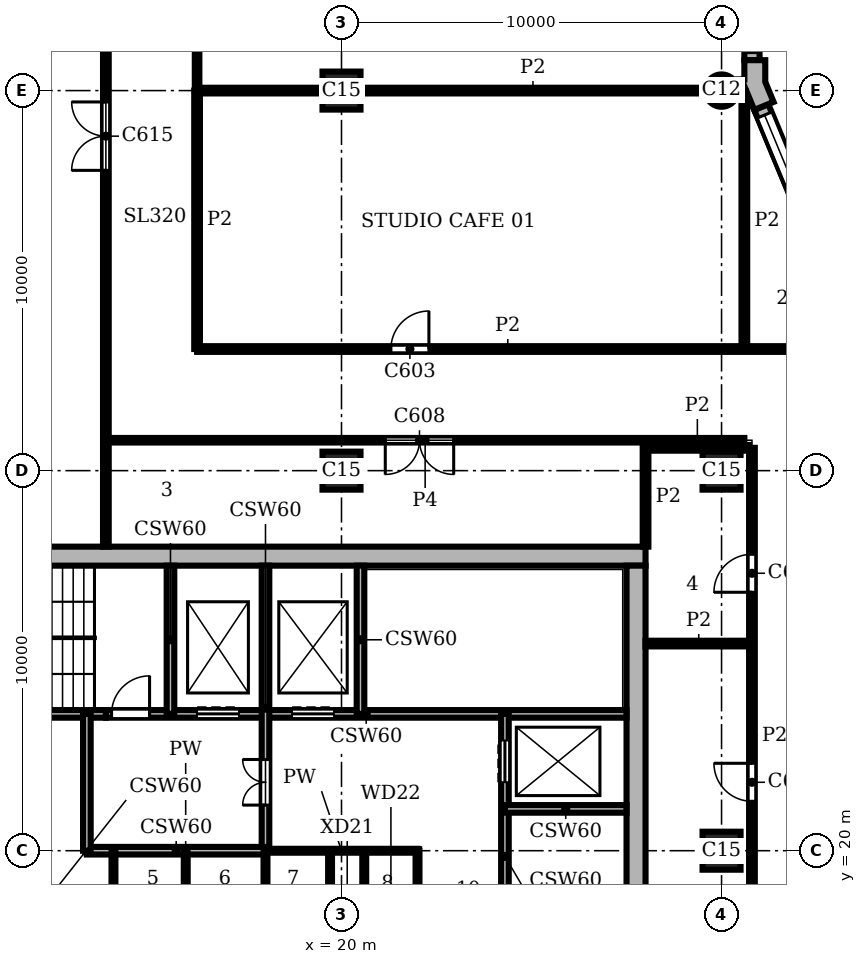
"""IFC4 building model, lengths in metres.
Left out: names, types, materials, properties, quantities, classifications, styles, units other than length and angle.
Written with IfcOpenShell. Run it as: python <this file> out.ifc"""

import sys

from ifc_helpers import new_model, si_unit, direction, frame, frame_2d, origin, origin_2d, place, context, subcontext, project, spatial, polyline, rectangle, circle, outline, extrude, element, fill, save


model = new_model("IFC4")
c1 = context("Model", 3, precision=1e-05, world=origin(), true_north=direction((0.0, 1.0)))
c2 = subcontext(c1, "Body", "Model", "MODEL_VIEW")
j1 = project(units=[si_unit("LENGTHUNIT", "METRE"), si_unit("PLANEANGLEUNIT", "RADIAN")], contexts=[c1])
p1 = place(None, origin())
s1 = spatial("IfcSite", under=j1, at=p1, CompositionType="ELEMENT")
p2 = place(p1, origin())
s2 = spatial("IfcBuilding", under=s1, at=p2, CompositionType="ELEMENT")
p3 = place(p2, frame((0.0, 0.0, 294.3)))
s3 = spatial("IfcBuildingStorey", under=s2, at=p3, CompositionType="ELEMENT", Elevation=294.3)
p4 = place(p3, frame((30.0, 40.0, 0.0), z_axis=(0.0, 0.0, 1.0), x_axis=(1.0, 0.0, 0.0)))
e1 = element("IfcColumn", 1, at=p4, inside=s3, PredefinedType="COLUMN", context=c2, shape_type="SweptSolid", body=[
    extrude(circle(Radius=0.425, at=origin_2d()), origin(), (0.0, 0.0, 1.0), 3.9),
])
for number, where, z_axis, x_axis in (
    (2, (20.0, 30.0, 0.0), (0.0, 0.0, 1.0), (1.0, 0.0, 0.0)),
    (3, (20.0, 40.0, 0.0), (0.0, 0.0, 1.0), (1.0, 0.0, 0.0)),
    (4, (30.0, 20.0, 0.0), (0.0, 0.0, 1.0), (1.0, 0.0, 0.0)),
    (5, (30.0, 30.0, 0.0), (0.0, 0.0, 1.0), (1.0, 0.0, 0.0)),
):
    element("IfcColumn", number, at=place(p3, frame(where, z_axis=z_axis, x_axis=x_axis)), inside=s3, PredefinedType="COLUMN", context=c2, shape_type="SweptSolid", body=[
        extrude(rectangle(XDim=1.0, YDim=1.0, at=origin_2d()), origin(), (0.0, 0.0, 1.0), 3.9),
    ])
p5 = place(p3, frame((27.75, 8.5, 0.0), z_axis=(0.0, 0.0, 1.0), x_axis=(0.0, 1.0, 0.0)))
e6 = element("IfcWall", 6, at=p5, inside=s3, PredefinedType="SHEAR", context=c2, shape_type="SweptSolid", body=[
    extrude(rectangle(XDim=19.0, YDim=0.5, at=frame_2d((9.5, 0.0))), origin(), (0.0, 0.0, 1.0), 3.9),
])
p6 = place(p5, frame((4.95, 0.0, 0.0)))
e7 = element("IfcOpeningElement", 7, at=p6, cuts=e6, PredefinedType="OPENING", context=c2, shape_type="SweptSolid", body=[
    extrude(rectangle(XDim=1.6, YDim=2.1, at=frame_2d((0.8, 1.05))), frame((0.0, 0.26, 0.0), z_axis=(0.0, -1.0, 0.0), x_axis=(1.0, 0.0, 0.0)), (0.0, 0.0, 1.0), 0.52),
])
p7 = place(p3, frame((28.0, 27.75, 0.0), z_axis=(0.0, 0.0, 1.0), x_axis=(-1.0, 0.0, 0.0)))
e8 = element("IfcWall", 8, at=p7, inside=s3, PredefinedType="SHEAR", context=c2, shape_type="SweptSolid", body=[
    extrude(rectangle(XDim=20.0, YDim=0.5, at=frame_2d((10.0, 0.0))), origin(), (0.0, 0.0, 1.0), 3.9),
])
p8 = place(p3, origin())
e9 = element("IfcWall", 9, at=p8, inside=s3, PredefinedType="SOLIDWALL", context=c2, shape_type="SweptSolid", body=[
    extrude(outline(polyline([(30.62, 39.995), (30.62, 40.071), (30.861, 39.49), (31.23, 39.644), (31.369, 39.701), (31.15, 40.229), (31.15, 40.8), (31.0, 40.8), (30.6, 40.8), (30.6, 40.295), (30.425, 40.295), (30.425, 39.995), (30.62, 39.995)])), origin(), (0.0, 0.0, 1.0), 3.9),
])
p9 = place(p3, frame((33.362, 33.974, 0.0), z_axis=(0.0, 0.0, 1.0), x_axis=(-0.382655745237, 0.923891000409, 0.0)))
e10 = element("IfcWall", 10, at=p9, inside=s3, PredefinedType="SOLIDWALL", context=c2, shape_type="SweptSolid", body=[
    extrude(rectangle(XDim=6.053, YDim=0.4, at=frame_2d((3.027, 0.0))), origin(), (0.0, 0.0, 1.0), 3.9),
])
p10 = place(p9, frame((0.227, 0.0, 0.9)))
e11 = element("IfcOpeningElement", 11, at=p10, cuts=e10, PredefinedType="OPENING", context=c2, shape_type="SweptSolid", body=[
    extrude(rectangle(XDim=5.6, YDim=2.35, at=frame_2d((2.8, 1.175))), frame((0.0, 0.21, 0.0), z_axis=(0.0, -1.0, 0.0), x_axis=(1.0, 0.0, 0.0)), (0.0, 0.0, 1.0), 0.42),
])
p11 = place(p3, frame((30.8, 40.8, 0.0), z_axis=(0.0, 0.0, 1.0), x_axis=(0.0, 1.0, 0.0)))
e12 = element("IfcWall", 12, at=p11, inside=s3, PredefinedType="SOLIDWALL", context=c2, shape_type="SweptSolid", body=[
    extrude(rectangle(XDim=18.4, YDim=0.4, at=frame_2d((9.2, 0.0))), origin(), (0.0, 0.0, 1.0), 3.9),
])
p12 = place(p11, frame((0.2, 0.0, 0.9)))
e13 = element("IfcOpeningElement", 13, at=p12, cuts=e12, PredefinedType="OPENING", context=c2, shape_type="SweptSolid", body=[
    extrude(rectangle(XDim=8.0, YDim=2.35, at=frame_2d((4.0, 1.175))), frame((0.0, 0.21, 0.0), z_axis=(0.0, -1.0, 0.0), x_axis=(1.0, 0.0, 0.0)), (0.0, 0.0, 1.0), 0.42),
])
p13 = place(p11, frame((10.2, 0.0, 0.9)))
e14 = element("IfcOpeningElement", 14, at=p13, cuts=e12, PredefinedType="OPENING", context=c2, shape_type="SweptSolid", body=[
    extrude(rectangle(XDim=8.0, YDim=2.35, at=frame_2d((4.0, 1.175))), frame((0.0, 0.21, 0.0), z_axis=(0.0, -1.0, 0.0), x_axis=(1.0, 0.0, 0.0)), (0.0, 0.0, 1.0), 0.42),
])
p14 = place(p3, frame((18.0, 20.0, 0.0), z_axis=(0.0, 0.0, 1.0), x_axis=(1.0, 0.0, 0.0)))
e15 = element("IfcWall", 15, at=p14, inside=s3, PredefinedType="PARTITIONING", context=c2, shape_type="SweptSolid", body=[
    extrude(rectangle(XDim=4.0, YDim=0.1, at=frame_2d((2.0, 0.0))), origin(), (0.0, 0.0, 1.0), 3.58),
])
p15 = place(p3, frame((13.3, 20.0, 0.0), z_axis=(0.0, 0.0, 1.0), x_axis=(1.0, 0.0, 0.0)))
e16 = element("IfcWall", 16, at=p15, inside=s3, PredefinedType="SHEAR", context=c2, shape_type="SweptSolid", body=[
    extrude(rectangle(XDim=4.7, YDim=0.2, at=frame_2d((2.35, 0.0))), origin(), (0.0, 0.0, 1.0), 3.58),
])
p16 = place(p3, frame((24.3, 21.1, 0.0), z_axis=(0.0, 0.0, 1.0), x_axis=(1.0, 0.0, 0.0)))
e17 = element("IfcWall", 17, at=p16, inside=s3, PredefinedType="SHEAR", context=c2, shape_type="SweptSolid", body=[
    extrude(rectangle(XDim=3.2, YDim=0.2, at=frame_2d((1.6, 0.0))), origin(), (0.0, 0.0, 1.0), 3.58),
])
p17 = place(p3, frame((8.5, 23.6, 0.0), z_axis=(0.0, 0.0, 1.0), x_axis=(1.0, 0.0, 0.0)))
e18 = element("IfcWall", 18, at=p17, inside=s3, PredefinedType="SHEAR", context=c2, shape_type="SweptSolid", body=[
    extrude(rectangle(XDim=5.3, YDim=0.2, at=frame_2d((2.65, 0.0))), origin(), (0.0, 0.0, 1.0), 3.58),
])
p18 = place(p3, frame((13.8, 23.6, 0.0), z_axis=(0.0, 0.0, 1.0), x_axis=(1.0, 0.0, 0.0)))
e19 = element("IfcWall", 19, at=p18, inside=s3, PredefinedType="SHEAR", context=c2, shape_type="SweptSolid", body=[
    extrude(rectangle(XDim=13.7, YDim=0.2, at=frame_2d((6.85, 0.0))), origin(), (0.0, 0.0, 1.0), 3.58),
])
p19 = place(p18, frame((2.4, 0.0, 0.0)))
e20 = element("IfcOpeningElement", 20, at=p19, cuts=e19, PredefinedType="OPENING", context=c2, shape_type="SweptSolid", body=[
    extrude(rectangle(XDim=1.1, YDim=2.1, at=frame_2d((0.55, 1.05))), frame((0.0, 0.11, 0.0), z_axis=(0.0, -1.0, 0.0), x_axis=(1.0, 0.0, 0.0)), (0.0, 0.0, 1.0), 0.22),
])
p20 = place(p18, frame((4.9, 0.0, 0.0)))
e21 = element("IfcOpeningElement", 21, at=p20, cuts=e19, PredefinedType="OPENING", context=c2, shape_type="SweptSolid", body=[
    extrude(rectangle(XDim=1.1, YDim=2.1, at=frame_2d((0.55, 1.05))), frame((0.0, 0.11, 0.0), z_axis=(0.0, -1.0, 0.0), x_axis=(1.0, 0.0, 0.0)), (0.0, 0.0, 1.0), 0.22),
])
p21 = place(p18, frame((0.15, 0.0, 0.0)))
e22 = element("IfcOpeningElement", 22, at=p21, cuts=e19, PredefinedType="OPENING", context=c2, shape_type="SweptSolid", body=[
    extrude(rectangle(XDim=1.0, YDim=2.1, at=frame_2d((0.5, 1.05))), frame((0.0, 0.11, 0.0), z_axis=(0.0, -1.0, 0.0), x_axis=(1.0, 0.0, 0.0)), (0.0, 0.0, 1.0), 0.22),
])
p22 = place(p3, frame((13.3, 20.0, 0.0), z_axis=(0.0, 0.0, 1.0), x_axis=(0.0, 1.0, 0.0)))
e23 = element("IfcWall", 23, at=p22, inside=s3, PredefinedType="SHEAR", context=c2, shape_type="SweptSolid", body=[
    extrude(rectangle(XDim=3.6, YDim=0.2, at=frame_2d((1.8, 0.0))), origin(), (0.0, 0.0, 1.0), 3.58),
])
p23 = place(p3, frame((14.0, 16.2, 0.0), z_axis=(0.0, 0.0, 1.0), x_axis=(0.0, 1.0, 0.0)))
e24 = element("IfcWall", 24, at=p23, inside=s3, PredefinedType="PARTITIONING", context=c2, shape_type="SweptSolid", body=[
    extrude(rectangle(XDim=3.8, YDim=0.1, at=frame_2d((1.9, 0.0))), origin(), (0.0, 0.0, 1.0), 3.58),
])
p24 = place(p3, frame((15.5, 23.6, 0.0), z_axis=(0.0, 0.0, 1.0), x_axis=(0.0, 1.0, 0.0)))
e25 = element("IfcWall", 25, at=p24, inside=s3, PredefinedType="SHEAR", context=c2, shape_type="SweptSolid", body=[
    extrude(rectangle(XDim=3.9, YDim=0.2, at=frame_2d((1.95, 0.0))), origin(), (0.0, 0.0, 1.0), 3.58),
])
for number, where, z_axis, x_axis in (
    (26, (15.9, 17.7, 0.0), (0.0, 0.0, 1.0), (0.0, 1.0, 0.0)),
    (27, (18.0, 17.7, 0.0), (0.0, 0.0, 1.0), (0.0, 1.0, 0.0)),
):
    element("IfcWall", number, at=place(p3, frame(where, z_axis=z_axis, x_axis=x_axis)), inside=s3, PredefinedType="PARTITIONING", context=c2, shape_type="SweptSolid", body=[
        extrude(rectangle(XDim=2.3, YDim=0.1, at=frame_2d((1.15, 0.0))), origin(), (0.0, 0.0, 1.0), 3.58),
    ])
p25 = place(p3, frame((18.0, 20.0, 0.0), z_axis=(0.0, 0.0, 1.0), x_axis=(0.0, 1.0, 0.0)))
e28 = element("IfcWall", 28, at=p25, inside=s3, PredefinedType="SHEAR", context=c2, shape_type="SweptSolid", body=[
    extrude(rectangle(XDim=7.5, YDim=0.2, at=frame_2d((3.75, 0.0))), origin(), (0.0, 0.0, 1.0), 3.58),
])
p26 = place(p25, frame((1.2, 0.0, 0.0)))
e29 = element("IfcOpeningElement", 29, at=p26, cuts=e28, PredefinedType="OPENING", context=c2, shape_type="SweptSolid", body=[
    extrude(rectangle(XDim=1.2, YDim=2.1, at=frame_2d((0.6, 1.05))), frame((0.0, 0.11, 0.0), z_axis=(0.0, -1.0, 0.0), x_axis=(1.0, 0.0, 0.0)), (0.0, 0.0, 1.0), 0.22),
])
p27 = place(p3, frame((19.7, 17.7, 0.0), z_axis=(0.0, 0.0, 1.0), x_axis=(0.0, 1.0, 0.0)))
e30 = element("IfcWall", 30, at=p27, inside=s3, PredefinedType="PARTITIONING", context=c2, shape_type="SweptSolid", body=[
    extrude(rectangle(XDim=2.3, YDim=0.1, at=frame_2d((1.15, 0.0))), origin(), (0.0, 0.0, 1.0), 3.58),
])
p28 = place(p3, frame((20.5, 23.6, 0.0), z_axis=(0.0, 0.0, 1.0), x_axis=(0.0, 1.0, 0.0)))
e31 = element("IfcWall", 31, at=p28, inside=s3, PredefinedType="SHEAR", context=c2, shape_type="SweptSolid", body=[
    extrude(rectangle(XDim=3.9, YDim=0.2, at=frame_2d((1.95, 0.0))), origin(), (0.0, 0.0, 1.0), 3.58),
])
p29 = place(p3, frame((20.6, 17.7, 0.0), z_axis=(0.0, 0.0, 1.0), x_axis=(0.0, 1.0, 0.0)))
e32 = element("IfcWall", 32, at=p29, inside=s3, PredefinedType="PARTITIONING", context=c2, shape_type="SweptSolid", body=[
    extrude(rectangle(XDim=2.3, YDim=0.1, at=frame_2d((1.15, 0.0))), origin(), (0.0, 0.0, 1.0), 3.58),
])
p30 = place(p3, frame((22.0, 16.2, 0.0), z_axis=(0.0, 0.0, 1.0), x_axis=(0.0, 1.0, 0.0)))
e33 = element("IfcWall", 33, at=p30, inside=s3, PredefinedType="PARTITIONING", context=c2, shape_type="SweptSolid", body=[
    extrude(rectangle(XDim=3.8, YDim=0.1, at=frame_2d((1.9, 0.0))), origin(), (0.0, 0.0, 1.0), 3.58),
])
p31 = place(p30, frame((0.2, 0.0, 0.0)))
e34 = element("IfcOpeningElement", 34, at=p31, cuts=e33, PredefinedType="OPENING", context=c2, shape_type="SweptSolid", body=[
    extrude(rectangle(XDim=1.1, YDim=2.1, at=frame_2d((0.55, 1.05))), frame((0.0, 0.06, 0.0), z_axis=(0.0, -1.0, 0.0), x_axis=(1.0, 0.0, 0.0)), (0.0, 0.0, 1.0), 0.12),
])
p32 = place(p3, frame((24.3, 16.1, 0.0), z_axis=(0.0, 0.0, 1.0), x_axis=(0.0, 1.0, 0.0)))
e35 = element("IfcWall", 35, at=p32, inside=s3, PredefinedType="SHEAR", context=c2, shape_type="SweptSolid", body=[
    extrude(rectangle(XDim=7.5, YDim=0.2, at=frame_2d((3.75, 0.0))), origin(), (0.0, 0.0, 1.0), 3.58),
])
p33 = place(p32, frame((5.7, 0.0, 0.0)))
e36 = element("IfcOpeningElement", 36, at=p33, cuts=e35, PredefinedType="OPENING", context=c2, shape_type="SweptSolid", body=[
    extrude(rectangle(XDim=1.1, YDim=2.1, at=frame_2d((0.55, 1.05))), frame((0.0, 0.11, 0.0), z_axis=(0.0, -1.0, 0.0), x_axis=(1.0, 0.0, 0.0)), (0.0, 0.0, 1.0), 0.22),
])
p34 = place(p3, frame((13.8, 28.0, 0.0), z_axis=(0.0, 0.0, 1.0), x_axis=(0.0, 1.0, 0.0)))
e37 = element("IfcWall", 37, at=p34, inside=s3, PredefinedType="PARTITIONING", context=c2, shape_type="SweptSolid", body=[
    extrude(rectangle(XDim=29.6, YDim=0.15, at=frame_2d((14.8, 0.0))), origin(), (0.0, 0.0, 1.0), 3.58),
])
p35 = place(p34, frame((9.901, 0.0, 0.0)))
e38 = element("IfcOpeningElement", 38, at=p35, cuts=e37, PredefinedType="OPENING", context=c2, shape_type="SweptSolid", body=[
    extrude(rectangle(XDim=1.8, YDim=2.1, at=frame_2d((0.9, 1.05))), frame((0.0, 0.085, 0.0), z_axis=(0.0, -1.0, 0.0), x_axis=(1.0, 0.0, 0.0)), (0.0, 0.0, 1.0), 0.17),
])
p36 = place(p3, frame((16.2, 33.2, 0.0), z_axis=(0.0, 0.0, 1.0), x_axis=(0.0, 1.0, 0.0)))
e39 = element("IfcWall", 39, at=p36, inside=s3, PredefinedType="PARTITIONING", context=c2, shape_type="SweptSolid", body=[
    extrude(rectangle(XDim=6.8, YDim=0.15, at=frame_2d((3.4, 0.0))), origin(), (0.0, 0.0, 1.0), 3.58),
])
p37 = place(p3, frame((28.0, 28.0, 0.0), z_axis=(0.0, 0.0, 1.0), x_axis=(0.0, 1.0, 0.0)))
e40 = element("IfcWall", 40, at=p37, inside=s3, PredefinedType="PARTITIONING", context=c2, shape_type="SweptSolid", body=[
    extrude(rectangle(XDim=2.598, YDim=0.15, at=frame_2d((1.299, 0.0))), origin(), (0.0, 0.0, 1.0), 3.58),
])
p38 = place(p3, frame((30.6, 33.2, 0.0), z_axis=(0.0, 0.0, 1.0), x_axis=(0.0, 1.0, 0.0)))
e41 = element("IfcWall", 41, at=p38, inside=s3, PredefinedType="PARTITIONING", context=c2, shape_type="SweptSolid", body=[
    extrude(rectangle(XDim=6.738, YDim=0.15, at=frame_2d((3.369, 0.0))), origin(), (0.0, 0.0, 1.0), 3.58),
])
p39 = place(p3, frame((30.8, 15.45, 0.0), z_axis=(0.0, 0.0, 1.0), x_axis=(0.0, 1.0, 0.0)))
e42 = element("IfcWall", 42, at=p39, inside=s3, PredefinedType="PARTITIONING", context=c2, shape_type="SweptSolid", body=[
    extrude(rectangle(XDim=15.15, YDim=0.15, at=frame_2d((7.575, 0.0))), origin(), (0.0, 0.0, 1.0), 3.58),
])
p40 = place(p39, frame((5.85, 0.0, 0.0)))
e43 = element("IfcOpeningElement", 43, at=p40, cuts=e42, PredefinedType="OPENING", context=c2, shape_type="SweptSolid", body=[
    extrude(rectangle(XDim=1.0, YDim=2.1, at=frame_2d((0.5, 1.05))), frame((0.0, 0.085, 0.0), z_axis=(0.0, -1.0, 0.0), x_axis=(1.0, 0.0, 0.0)), (0.0, 0.0, 1.0), 0.17),
])
p41 = place(p39, frame((11.35, 0.0, 0.0)))
e44 = element("IfcOpeningElement", 44, at=p41, cuts=e42, PredefinedType="OPENING", context=c2, shape_type="SweptSolid", body=[
    extrude(rectangle(XDim=1.0, YDim=2.1, at=frame_2d((0.5, 1.05))), frame((0.0, 0.085, 0.0), z_axis=(0.0, -1.0, 0.0), x_axis=(1.0, 0.0, 0.0)), (0.0, 0.0, 1.0), 0.17),
])
p42 = place(p3, frame((28.0, 25.45, 0.0), z_axis=(0.0, 0.0, 1.0), x_axis=(1.0, 0.0, 0.0)))
e45 = element("IfcWall", 45, at=p42, inside=s3, PredefinedType="PARTITIONING", context=c2, shape_type="SweptSolid", body=[
    extrude(rectangle(XDim=2.8, YDim=0.15, at=frame_2d((1.4, 0.0))), origin(), (0.0, 0.0, 1.0), 3.58),
])
p43 = place(p3, frame((28.002, 30.6, 0.0), z_axis=(0.0, 0.0, 1.0), x_axis=(1.0, 0.0, 0.0)))
e46 = element("IfcWall", 46, at=p43, inside=s3, PredefinedType="PARTITIONING", context=c2, shape_type="SweptSolid", body=[
    extrude(rectangle(XDim=2.723, YDim=0.15, at=frame_2d((1.362, 0.0))), origin(), (0.0, 0.0, 1.0), 3.58),
])
p44 = place(p3, frame((16.2, 33.2, 0.0), z_axis=(0.0, 0.0, 1.0), x_axis=(1.0, 0.0, 0.0)))
e47 = element("IfcWall", 47, at=p44, inside=s3, PredefinedType="PARTITIONING", context=c2, shape_type="SweptSolid", body=[
    extrude(rectangle(XDim=16.352, YDim=0.15, at=frame_2d((8.176, 0.0))), origin(), (0.0, 0.0, 1.0), 3.58),
])
p45 = place(p44, frame((5.1, 0.0, 0.0)))
e48 = element("IfcOpeningElement", 48, at=p45, cuts=e47, PredefinedType="OPENING", context=c2, shape_type="SweptSolid", body=[
    extrude(rectangle(XDim=1.0, YDim=2.1, at=frame_2d((0.5, 1.05))), frame((0.0, 0.085, 0.0), z_axis=(0.0, -1.0, 0.0), x_axis=(1.0, 0.0, 0.0)), (0.0, 0.0, 1.0), 0.17),
])
p46 = place(p3, frame((16.2, 40.0, 0.0), z_axis=(0.0, 0.0, 1.0), x_axis=(1.0, 0.0, 0.0)))
e49 = element("IfcWall", 49, at=p46, inside=s3, PredefinedType="PARTITIONING", context=c2, shape_type="SweptSolid", body=[
    extrude(rectangle(XDim=3.3, YDim=0.15, at=frame_2d((1.65, 0.0))), origin(), (0.0, 0.0, 1.0), 3.58),
])
p47 = place(p3, frame((20.5, 40.0, 0.0), z_axis=(0.0, 0.0, 1.0), x_axis=(1.0, 0.0, 0.0)))
e50 = element("IfcWall", 50, at=p47, inside=s3, PredefinedType="PARTITIONING", context=c2, shape_type="SweptSolid", body=[
    extrude(rectangle(XDim=9.075, YDim=0.15, at=frame_2d((4.538, 0.0))), origin(), (0.0, 0.0, 1.0), 3.58),
])
p48 = place(p3, frame((16.2, 40.0, 0.0), z_axis=(0.0, 0.0, 1.0), x_axis=(0.0, 1.0, 0.0)))
e51 = element("IfcWall", 51, at=p48, inside=s3, PredefinedType="PARTITIONING", context=c2, shape_type="SweptSolid", body=[
    extrude(rectangle(XDim=10.0, YDim=0.12, at=frame_2d((5.0, 0.0))), origin(), (0.0, 0.0, 1.0), 3.58),
])
p49 = place(p48, frame((4.1, 0.0, 0.0)))
e52 = element("IfcOpeningElement", 52, at=p49, cuts=e51, PredefinedType="OPENING", context=c2, shape_type="SweptSolid", body=[
    extrude(rectangle(XDim=1.0, YDim=2.1, at=frame_2d((0.5, 1.05))), frame((0.0, 0.07, 0.0), z_axis=(0.0, -1.0, 0.0), x_axis=(1.0, 0.0, 0.0)), (0.0, 0.0, 1.0), 0.14),
])
p50 = place(p3, frame((13.802, 30.8, 0.0), z_axis=(0.0, 0.0, 1.0), x_axis=(1.0, 0.0, 0.0)))
e53 = element("IfcWall", 53, at=p50, inside=s3, PredefinedType="PARTITIONING", context=c2, shape_type="SweptSolid", body=[
    extrude(rectangle(XDim=16.798, YDim=0.12, at=frame_2d((8.399, 0.0))), origin(), (0.0, 0.0, 1.0), 3.58),
])
p51 = place(p50, frame((7.35, 0.0, 0.0)))
e54 = element("IfcOpeningElement", 54, at=p51, cuts=e53, PredefinedType="OPENING", context=c2, shape_type="SweptSolid", body=[
    extrude(rectangle(XDim=1.8, YDim=2.1, at=frame_2d((0.9, 1.05))), frame((0.0, 0.07, 0.0), z_axis=(0.0, -1.0, 0.0), x_axis=(1.0, 0.0, 0.0)), (0.0, 0.0, 1.0), 0.14),
])
p52 = place(p10, origin())
e55 = element("IfcWindow", 55, at=p52, inside=s3, PartitioningType="SINGLE_PANEL", PredefinedType="WINDOW", context=c2, shape_type="SweptSolid", body=[
    extrude(rectangle(XDim=5.6, YDim=2.35, at=frame_2d((2.8, 1.175))), frame((0.0, 0.16, 0.0), z_axis=(0.0, -1.0, 0.0), x_axis=(1.0, 0.0, 0.0)), (0.0, 0.0, 1.0), 0.06),
])
fill(e11, e55)
p53 = place(p33, origin())
e56 = element("IfcDoor", 56, at=p53, inside=s3, OperationType="DOUBLE_DOOR_SLIDING", PredefinedType="DOOR", context=c2, shape_type="SweptSolid", body=[
    extrude(rectangle(XDim=1.1, YDim=2.1, at=frame_2d((0.55, 1.05))), frame((0.0, 0.025, 0.0), z_axis=(0.0, -1.0, 0.0), x_axis=(1.0, 0.0, 0.0)), (0.0, 0.0, 1.0), 0.05),
])
fill(e36, e56)
p54 = place(p19, origin())
e57 = element("IfcDoor", 57, at=p54, inside=s3, OperationType="DOUBLE_DOOR_SLIDING", PredefinedType="DOOR", context=c2, shape_type="SweptSolid", body=[
    extrude(rectangle(XDim=1.1, YDim=2.1, at=frame_2d((0.55, 1.05))), frame((0.0, 0.025, 0.0), z_axis=(0.0, -1.0, 0.0), x_axis=(1.0, 0.0, 0.0)), (0.0, 0.0, 1.0), 0.05),
])
fill(e20, e57)
p55 = place(p20, origin())
e58 = element("IfcDoor", 58, at=p55, inside=s3, OperationType="DOUBLE_DOOR_SLIDING", PredefinedType="DOOR", context=c2, shape_type="SweptSolid", body=[
    extrude(rectangle(XDim=1.1, YDim=2.1, at=frame_2d((0.55, 1.05))), frame((0.0, 0.025, 0.0), z_axis=(0.0, -1.0, 0.0), x_axis=(1.0, 0.0, 0.0)), (0.0, 0.0, 1.0), 0.05),
])
fill(e21, e58)
p56 = place(p21, origin())
e59 = element("IfcDoor", 59, at=p56, inside=s3, OperationType="SINGLE_SWING_RIGHT", PredefinedType="DOOR", context=c2, shape_type="SweptSolid", body=[
    extrude(rectangle(XDim=1.0, YDim=2.1, at=frame_2d((0.5, 1.05))), frame((0.0, 0.025, 0.0), z_axis=(0.0, -1.0, 0.0), x_axis=(1.0, 0.0, 0.0)), (0.0, 0.0, 1.0), 0.05),
])
fill(e22, e59)
p57 = place(p26, origin())
e60 = element("IfcDoor", 60, at=p57, inside=s3, OperationType="DOUBLE_DOOR_SINGLE_SWING", PredefinedType="DOOR", context=c2, shape_type="SweptSolid", body=[
    extrude(rectangle(XDim=1.2, YDim=2.1, at=frame_2d((0.6, 1.05))), frame((0.0, 0.025, 0.0), z_axis=(0.0, -1.0, 0.0), x_axis=(1.0, 0.0, 0.0)), (0.0, 0.0, 1.0), 0.05),
])
fill(e29, e60)
p58 = place(p45, origin())
e61 = element("IfcDoor", 61, at=p58, inside=s3, OperationType="SINGLE_SWING_RIGHT", PredefinedType="DOOR", context=c2, shape_type="SweptSolid", body=[
    extrude(rectangle(XDim=1.0, YDim=2.1, at=frame_2d((0.5, 1.05))), frame((0.0, 0.025, 0.0), z_axis=(0.0, -1.0, 0.0), x_axis=(1.0, 0.0, 0.0)), (0.0, 0.0, 1.0), 0.05),
])
fill(e48, e61)
p59 = place(p51, frame((1.8, 0.0, 0.0), z_axis=(0.0, 0.0, 1.0), x_axis=(-1.0, 0.0, 0.0)))
e62 = element("IfcDoor", 62, at=p59, inside=s3, OperationType="DOUBLE_DOOR_SINGLE_SWING", PredefinedType="DOOR", context=c2, shape_type="SweptSolid", body=[
    extrude(rectangle(XDim=1.8, YDim=2.1, at=frame_2d((0.9, 1.05))), frame((0.0, 0.025, 0.0), z_axis=(0.0, -1.0, 0.0), x_axis=(1.0, 0.0, 0.0)), (0.0, 0.0, 1.0), 0.05),
])
fill(e54, e62)
p60 = place(p40, origin())
e63 = element("IfcDoor", 63, at=p60, inside=s3, OperationType="SINGLE_SWING_RIGHT", PredefinedType="DOOR", context=c2, shape_type="SweptSolid", body=[
    extrude(rectangle(XDim=1.0, YDim=2.1, at=frame_2d((0.5, 1.05))), frame((0.0, 0.025, 0.0), z_axis=(0.0, -1.0, 0.0), x_axis=(1.0, 0.0, 0.0)), (0.0, 0.0, 1.0), 0.05),
])
fill(e43, e63)
p61 = place(p41, origin())
e64 = element("IfcDoor", 64, at=p61, inside=s3, OperationType="SINGLE_SWING_LEFT", PredefinedType="DOOR", context=c2, shape_type="SweptSolid", body=[
    extrude(rectangle(XDim=1.0, YDim=2.1, at=frame_2d((0.5, 1.05))), frame((0.0, 0.025, 0.0), z_axis=(0.0, -1.0, 0.0), x_axis=(1.0, 0.0, 0.0)), (0.0, 0.0, 1.0), 0.05),
])
fill(e44, e64)
p62 = place(p35, origin())
e65 = element("IfcDoor", 65, at=p62, inside=s3, OperationType="DOUBLE_DOOR_SINGLE_SWING", PredefinedType="DOOR", context=c2, shape_type="SweptSolid", body=[
    extrude(rectangle(XDim=1.8, YDim=2.1, at=frame_2d((0.9, 1.05))), frame((0.0, 0.025, 0.0), z_axis=(0.0, -1.0, 0.0), x_axis=(1.0, 0.0, 0.0)), (0.0, 0.0, 1.0), 0.05),
])
fill(e38, e65)
save(model, sys.argv[1])
